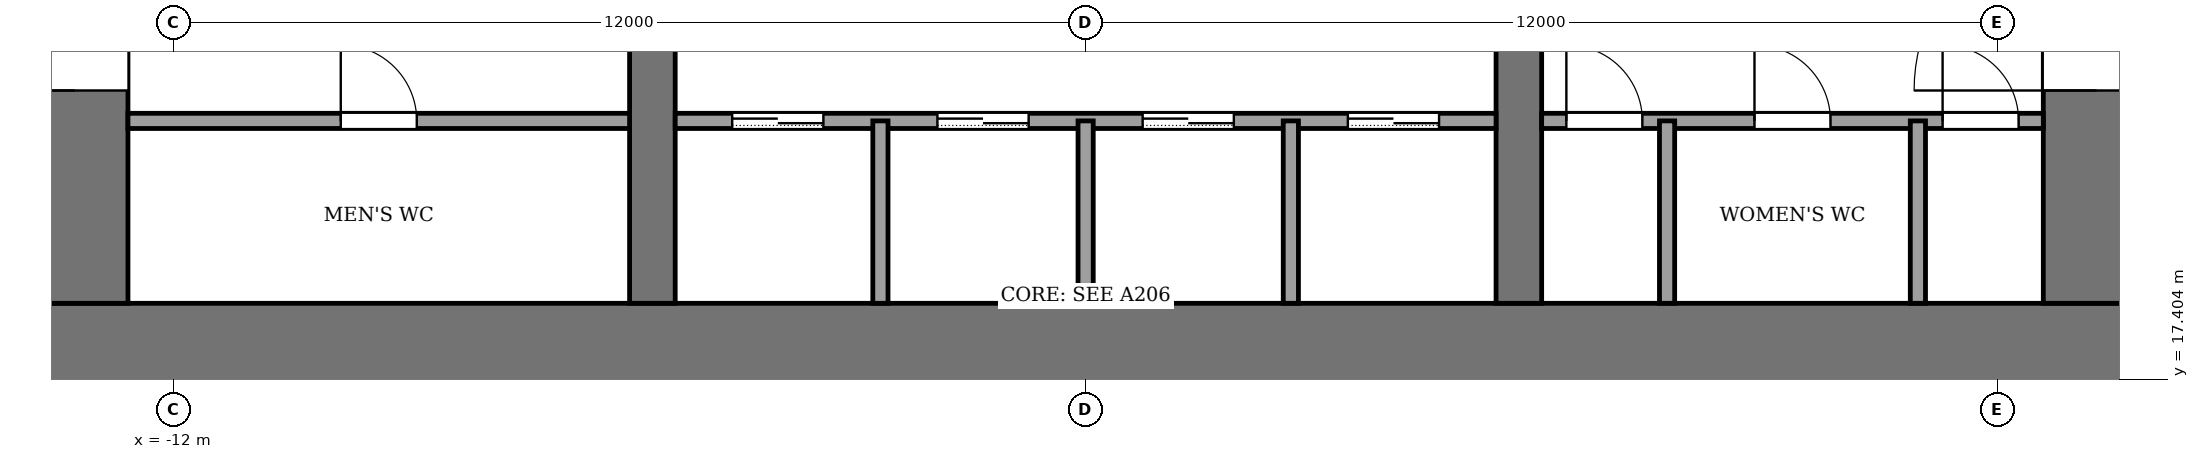
"""IFC4 building model, lengths in metres.
Left out: names, types, materials, properties, quantities, classifications, styles, units other than length and angle.
Written with IfcOpenShell. Run it as: python <this file> out.ifc"""

import sys

from ifc_helpers import new_model, si_unit, direction, frame, frame_2d, origin, place, context, subcontext, project, spatial, rectangle, extrude, element, fill, save


model = new_model("IFC4")
c1 = context("Model", 3, precision=1e-05, world=origin(), true_north=direction((0.0, 1.0)))
c2 = subcontext(c1, "Body", "Model", "MODEL_VIEW")
j1 = project(units=[si_unit("LENGTHUNIT", "METRE"), si_unit("PLANEANGLEUNIT", "RADIAN")], contexts=[c1])
p1 = place(None, origin())
s1 = spatial("IfcSite", under=j1, at=p1, CompositionType="ELEMENT")
p2 = place(p1, origin())
s2 = spatial("IfcBuilding", under=s1, at=p2, CompositionType="ELEMENT")
p3 = place(p2, frame((0.0, 0.0, 30.0)))
s3 = spatial("IfcBuildingStorey", under=s2, at=p3, CompositionType="ELEMENT", Elevation=30.0)
p4 = place(p3, frame((-14.0, 17.7, -0.13), z_axis=(0.0, 0.0, 1.0), x_axis=(1.0, 0.0, 0.0)))
e1 = element("IfcWall", 1, at=p4, inside=s3, PredefinedType="SHEAR", context=c2, shape_type="SweptSolid", body=[
    extrude(rectangle(XDim=28.0, YDim=1.4, at=frame_2d((14.0, 0.0))), origin(), (0.0, 0.0, 1.0), 4.0),
])
p5 = place(p3, frame((-13.3, 18.4, -0.13), z_axis=(0.0, 0.0, 1.0), x_axis=(0.0, 1.0, 0.0)))
e2 = element("IfcWall", 2, at=p5, inside=s3, PredefinedType="SHEAR", context=c2, shape_type="SweptSolid", body=[
    extrude(rectangle(XDim=19.2, YDim=1.4, at=frame_2d((9.6, 0.0))), origin(), (0.0, 0.0, 1.0), 4.0),
])
p6 = place(p5, frame((2.8, 0.0, 0.13)))
e3 = element("IfcOpeningElement", 3, at=p6, cuts=e2, PredefinedType="OPENING", context=c2, shape_type="SweptSolid", body=[
    extrude(rectangle(XDim=2.4, YDim=2.4, at=frame_2d((1.2, 1.2))), frame((0.0, 0.71, 0.0), z_axis=(0.0, -1.0, 0.0), x_axis=(1.0, 0.0, 0.0)), (0.0, 0.0, 1.0), 1.42),
])
p7 = place(p5, frame((13.4, 0.0, 0.13)))
e4 = element("IfcOpeningElement", 4, at=p7, cuts=e2, PredefinedType="OPENING", context=c2, shape_type="SweptSolid", body=[
    extrude(rectangle(XDim=1.4, YDim=2.2, at=frame_2d((0.7, 1.1))), frame((0.0, 0.71, 0.0), z_axis=(0.0, -1.0, 0.0), x_axis=(1.0, 0.0, 0.0)), (0.0, 0.0, 1.0), 1.42),
])
p8 = place(p3, frame((13.3, 18.4, -0.13), z_axis=(0.0, 0.0, 1.0), x_axis=(0.0, 1.0, 0.0)))
e5 = element("IfcWall", 5, at=p8, inside=s3, PredefinedType="SHEAR", context=c2, shape_type="SweptSolid", body=[
    extrude(rectangle(XDim=19.2, YDim=1.4, at=frame_2d((9.6, 0.0))), origin(), (0.0, 0.0, 1.0), 4.0),
])
p9 = place(p8, frame((2.8, 0.0, 0.13)))
e6 = element("IfcOpeningElement", 6, at=p9, cuts=e5, PredefinedType="OPENING", context=c2, shape_type="SweptSolid", body=[
    extrude(rectangle(XDim=2.4, YDim=2.4, at=frame_2d((1.2, 1.2))), frame((0.0, 0.71, 0.0), z_axis=(0.0, -1.0, 0.0), x_axis=(1.0, 0.0, 0.0)), (0.0, 0.0, 1.0), 1.42),
])
p10 = place(p8, frame((13.3, 0.0, 0.13)))
e7 = element("IfcOpeningElement", 7, at=p10, cuts=e5, PredefinedType="OPENING", context=c2, shape_type="SweptSolid", body=[
    extrude(rectangle(XDim=2.4, YDim=2.4, at=frame_2d((1.2, 1.2))), frame((0.0, 0.71, 0.0), z_axis=(0.0, -1.0, 0.0), x_axis=(1.0, 0.0, 0.0)), (0.0, 0.0, 1.0), 1.42),
])
p11 = place(p3, frame((-5.7, 18.4, -0.13), z_axis=(0.0, 0.0, 1.0), x_axis=(0.0, 1.0, 0.0)))
e8 = element("IfcWall", 8, at=p11, inside=s3, PredefinedType="SHEAR", context=c2, shape_type="SweptSolid", body=[
    extrude(rectangle(XDim=19.2, YDim=0.6, at=frame_2d((9.6, 0.0))), origin(), (0.0, 0.0, 1.0), 4.0),
])
p12 = place(p11, frame((8.35, 0.0, 0.13)))
e9 = element("IfcOpeningElement", 9, at=p12, cuts=e8, PredefinedType="OPENING", context=c2, shape_type="SweptSolid", body=[
    extrude(rectangle(XDim=0.9, YDim=2.1, at=frame_2d((0.45, 1.05))), frame((0.0, 0.31, 0.0), z_axis=(0.0, -1.0, 0.0), x_axis=(1.0, 0.0, 0.0)), (0.0, 0.0, 1.0), 0.62),
])
p13 = place(p3, frame((5.7, 18.4, -0.13), z_axis=(0.0, 0.0, 1.0), x_axis=(0.0, 1.0, 0.0)))
e10 = element("IfcWall", 10, at=p13, inside=s3, PredefinedType="SHEAR", context=c2, shape_type="SweptSolid", body=[
    extrude(rectangle(XDim=19.2, YDim=0.6, at=frame_2d((9.6, 0.0))), origin(), (0.0, 0.0, 1.0), 4.0),
])
p14 = place(p13, frame((13.3, 0.0, 0.13)))
e11 = element("IfcOpeningElement", 11, at=p14, cuts=e10, PredefinedType="OPENING", context=c2, shape_type="SweptSolid", body=[
    extrude(rectangle(XDim=2.4, YDim=2.4, at=frame_2d((1.2, 1.2))), frame((0.0, 0.31, 0.0), z_axis=(0.0, -1.0, 0.0), x_axis=(1.0, 0.0, 0.0)), (0.0, 0.0, 1.0), 0.62),
])
p15 = place(p3, frame((-12.6, 20.8, 0.0), z_axis=(0.0, 0.0, 1.0), x_axis=(1.0, 0.0, 0.0)))
e12 = element("IfcWall", 12, at=p15, inside=s3, PredefinedType="PARTITIONING", context=c2, shape_type="SweptSolid", body=[
    extrude(rectangle(XDim=6.6, YDim=0.2, at=frame_2d((3.3, 0.0))), origin(), (0.0, 0.0, 1.0), 3.87),
])
p16 = place(p15, frame((2.8, 0.0, 0.0)))
e13 = element("IfcOpeningElement", 13, at=p16, cuts=e12, PredefinedType="OPENING", context=c2, shape_type="SweptSolid", body=[
    extrude(rectangle(XDim=1.0, YDim=2.1, at=frame_2d((0.5, 1.05))), frame((0.0, 0.11, 0.0), z_axis=(0.0, -1.0, 0.0), x_axis=(1.0, 0.0, 0.0)), (0.0, 0.0, 1.0), 0.22),
])
p17 = place(p3, frame((-5.4, 20.8, 0.0), z_axis=(0.0, 0.0, 1.0), x_axis=(1.0, 0.0, 0.0)))
e14 = element("IfcWall", 14, at=p17, inside=s3, PredefinedType="PARTITIONING", context=c2, shape_type="SweptSolid", body=[
    extrude(rectangle(XDim=10.8, YDim=0.2, at=frame_2d((5.4, 0.0))), origin(), (0.0, 0.0, 1.0), 3.87),
])
p18 = place(p17, frame((0.75, 0.0, 0.0)))
e15 = element("IfcOpeningElement", 15, at=p18, cuts=e14, PredefinedType="OPENING", context=c2, shape_type="SweptSolid", body=[
    extrude(rectangle(XDim=1.2, YDim=2.2, at=frame_2d((0.6, 1.1))), frame((0.0, 0.11, 0.0), z_axis=(0.0, -1.0, 0.0), x_axis=(1.0, 0.0, 0.0)), (0.0, 0.0, 1.0), 0.22),
])
p19 = place(p17, frame((3.45, 0.0, 0.0)))
e16 = element("IfcOpeningElement", 16, at=p19, cuts=e14, PredefinedType="OPENING", context=c2, shape_type="SweptSolid", body=[
    extrude(rectangle(XDim=1.2, YDim=2.2, at=frame_2d((0.6, 1.1))), frame((0.0, 0.11, 0.0), z_axis=(0.0, -1.0, 0.0), x_axis=(1.0, 0.0, 0.0)), (0.0, 0.0, 1.0), 0.22),
])
p20 = place(p17, frame((6.15, 0.0, 0.0)))
e17 = element("IfcOpeningElement", 17, at=p20, cuts=e14, PredefinedType="OPENING", context=c2, shape_type="SweptSolid", body=[
    extrude(rectangle(XDim=1.2, YDim=2.2, at=frame_2d((0.6, 1.1))), frame((0.0, 0.11, 0.0), z_axis=(0.0, -1.0, 0.0), x_axis=(1.0, 0.0, 0.0)), (0.0, 0.0, 1.0), 0.22),
])
p21 = place(p17, frame((8.85, 0.0, 0.0)))
e18 = element("IfcOpeningElement", 18, at=p21, cuts=e14, PredefinedType="OPENING", context=c2, shape_type="SweptSolid", body=[
    extrude(rectangle(XDim=1.2, YDim=2.2, at=frame_2d((0.6, 1.1))), frame((0.0, 0.11, 0.0), z_axis=(0.0, -1.0, 0.0), x_axis=(1.0, 0.0, 0.0)), (0.0, 0.0, 1.0), 0.22),
])
p22 = place(p3, frame((6.0, 20.8, 0.0), z_axis=(0.0, 0.0, 1.0), x_axis=(1.0, 0.0, 0.0)))
e19 = element("IfcWall", 19, at=p22, inside=s3, PredefinedType="PARTITIONING", context=c2, shape_type="SweptSolid", body=[
    extrude(rectangle(XDim=6.6, YDim=0.2, at=frame_2d((3.3, 0.0))), origin(), (0.0, 0.0, 1.0), 3.87),
])
p23 = place(p22, frame((0.325, 0.0, 0.0)))
e20 = element("IfcOpeningElement", 20, at=p23, cuts=e19, PredefinedType="OPENING", context=c2, shape_type="SweptSolid", body=[
    extrude(rectangle(XDim=1.0, YDim=2.1, at=frame_2d((0.5, 1.05))), frame((0.0, 0.11, 0.0), z_axis=(0.0, -1.0, 0.0), x_axis=(1.0, 0.0, 0.0)), (0.0, 0.0, 1.0), 0.22),
])
p24 = place(p22, frame((2.8, 0.0, 0.0)))
e21 = element("IfcOpeningElement", 21, at=p24, cuts=e19, PredefinedType="OPENING", context=c2, shape_type="SweptSolid", body=[
    extrude(rectangle(XDim=1.0, YDim=2.1, at=frame_2d((0.5, 1.05))), frame((0.0, 0.11, 0.0), z_axis=(0.0, -1.0, 0.0), x_axis=(1.0, 0.0, 0.0)), (0.0, 0.0, 1.0), 0.22),
])
p25 = place(p22, frame((5.275, 0.0, 0.0)))
e22 = element("IfcOpeningElement", 22, at=p25, cuts=e19, PredefinedType="OPENING", context=c2, shape_type="SweptSolid", body=[
    extrude(rectangle(XDim=1.0, YDim=2.1, at=frame_2d((0.5, 1.05))), frame((0.0, 0.11, 0.0), z_axis=(0.0, -1.0, 0.0), x_axis=(1.0, 0.0, 0.0)), (0.0, 0.0, 1.0), 0.22),
])
for number, where, z_axis, x_axis in (
    (23, (-2.7, 18.4, 0.0), (0.0, 0.0, 1.0), (0.0, 1.0, 0.0)),
    (24, (0.0, 18.4, 0.0), (0.0, 0.0, 1.0), (0.0, 1.0, 0.0)),
    (25, (2.7, 18.4, 0.0), (0.0, 0.0, 1.0), (0.0, 1.0, 0.0)),
    (26, (7.65, 18.4, 0.0), (0.0, 0.0, 1.0), (0.0, 1.0, 0.0)),
    (27, (10.95, 18.4, 0.0), (0.0, 0.0, 1.0), (0.0, 1.0, 0.0)),
):
    element("IfcWall", number, at=place(p3, frame(where, z_axis=z_axis, x_axis=x_axis)), inside=s3, PredefinedType="PARTITIONING", context=c2, shape_type="SweptSolid", body=[
        extrude(rectangle(XDim=2.4, YDim=0.2, at=frame_2d((1.2, 0.0))), origin(), (0.0, 0.0, 1.0), 3.87),
    ])
p26 = place(p18, origin())
e28 = element("IfcDoor", 28, at=p26, inside=s3, OperationType="SLIDING_TO_LEFT", PredefinedType="DOOR", context=c2, shape_type="SweptSolid", body=[
    extrude(rectangle(XDim=1.2, YDim=2.2, at=frame_2d((0.6, 1.1))), frame((0.0, 0.025, 0.0), z_axis=(0.0, -1.0, 0.0), x_axis=(1.0, 0.0, 0.0)), (0.0, 0.0, 1.0), 0.05),
])
fill(e15, e28)
p27 = place(p19, origin())
e29 = element("IfcDoor", 29, at=p27, inside=s3, OperationType="SLIDING_TO_LEFT", PredefinedType="DOOR", context=c2, shape_type="SweptSolid", body=[
    extrude(rectangle(XDim=1.2, YDim=2.2, at=frame_2d((0.6, 1.1))), frame((0.0, 0.025, 0.0), z_axis=(0.0, -1.0, 0.0), x_axis=(1.0, 0.0, 0.0)), (0.0, 0.0, 1.0), 0.05),
])
fill(e16, e29)
p28 = place(p20, origin())
e30 = element("IfcDoor", 30, at=p28, inside=s3, OperationType="SLIDING_TO_LEFT", PredefinedType="DOOR", context=c2, shape_type="SweptSolid", body=[
    extrude(rectangle(XDim=1.2, YDim=2.2, at=frame_2d((0.6, 1.1))), frame((0.0, 0.025, 0.0), z_axis=(0.0, -1.0, 0.0), x_axis=(1.0, 0.0, 0.0)), (0.0, 0.0, 1.0), 0.05),
])
fill(e17, e30)
p29 = place(p21, origin())
e31 = element("IfcDoor", 31, at=p29, inside=s3, OperationType="SLIDING_TO_LEFT", PredefinedType="DOOR", context=c2, shape_type="SweptSolid", body=[
    extrude(rectangle(XDim=1.2, YDim=2.2, at=frame_2d((0.6, 1.1))), frame((0.0, 0.025, 0.0), z_axis=(0.0, -1.0, 0.0), x_axis=(1.0, 0.0, 0.0)), (0.0, 0.0, 1.0), 0.05),
])
fill(e18, e31)
p30 = place(p16, origin())
e32 = element("IfcDoor", 32, at=p30, inside=s3, OperationType="SINGLE_SWING_LEFT", PredefinedType="DOOR", context=c2, shape_type="SweptSolid", body=[
    extrude(rectangle(XDim=1.0, YDim=2.1, at=frame_2d((0.5, 1.05))), frame((0.0, 0.025, 0.0), z_axis=(0.0, -1.0, 0.0), x_axis=(1.0, 0.0, 0.0)), (0.0, 0.0, 1.0), 0.05),
])
fill(e13, e32)
p31 = place(p23, origin())
e33 = element("IfcDoor", 33, at=p31, inside=s3, OperationType="SINGLE_SWING_LEFT", PredefinedType="DOOR", context=c2, shape_type="SweptSolid", body=[
    extrude(rectangle(XDim=1.0, YDim=2.1, at=frame_2d((0.5, 1.05))), frame((0.0, 0.025, 0.0), z_axis=(0.0, -1.0, 0.0), x_axis=(1.0, 0.0, 0.0)), (0.0, 0.0, 1.0), 0.05),
])
fill(e20, e33)
p32 = place(p24, origin())
e34 = element("IfcDoor", 34, at=p32, inside=s3, OperationType="SINGLE_SWING_LEFT", PredefinedType="DOOR", context=c2, shape_type="SweptSolid", body=[
    extrude(rectangle(XDim=1.0, YDim=2.1, at=frame_2d((0.5, 1.05))), frame((0.0, 0.025, 0.0), z_axis=(0.0, -1.0, 0.0), x_axis=(1.0, 0.0, 0.0)), (0.0, 0.0, 1.0), 0.05),
])
fill(e21, e34)
p33 = place(p25, origin())
e35 = element("IfcDoor", 35, at=p33, inside=s3, OperationType="SINGLE_SWING_LEFT", PredefinedType="DOOR", context=c2, shape_type="SweptSolid", body=[
    extrude(rectangle(XDim=1.0, YDim=2.1, at=frame_2d((0.5, 1.05))), frame((0.0, 0.025, 0.0), z_axis=(0.0, -1.0, 0.0), x_axis=(1.0, 0.0, 0.0)), (0.0, 0.0, 1.0), 0.05),
])
fill(e22, e35)
p34 = place(p6, origin())
e36 = element("IfcDoor", 36, at=p34, inside=s3, OperationType="DOUBLE_DOOR_SINGLE_SWING", PredefinedType="DOOR", context=c2, shape_type="SweptSolid", body=[
    extrude(rectangle(XDim=2.4, YDim=2.4, at=frame_2d((1.2, 1.2))), frame((0.0, 0.025, 0.0), z_axis=(0.0, -1.0, 0.0), x_axis=(1.0, 0.0, 0.0)), (0.0, 0.0, 1.0), 0.05),
])
fill(e3, e36)
p35 = place(p9, origin())
e37 = element("IfcDoor", 37, at=p35, inside=s3, OperationType="DOUBLE_DOOR_SINGLE_SWING", PredefinedType="DOOR", context=c2, shape_type="SweptSolid", body=[
    extrude(rectangle(XDim=2.4, YDim=2.4, at=frame_2d((1.2, 1.2))), frame((0.0, 0.025, 0.0), z_axis=(0.0, -1.0, 0.0), x_axis=(1.0, 0.0, 0.0)), (0.0, 0.0, 1.0), 0.05),
])
fill(e6, e37)
save(model, sys.argv[1])
